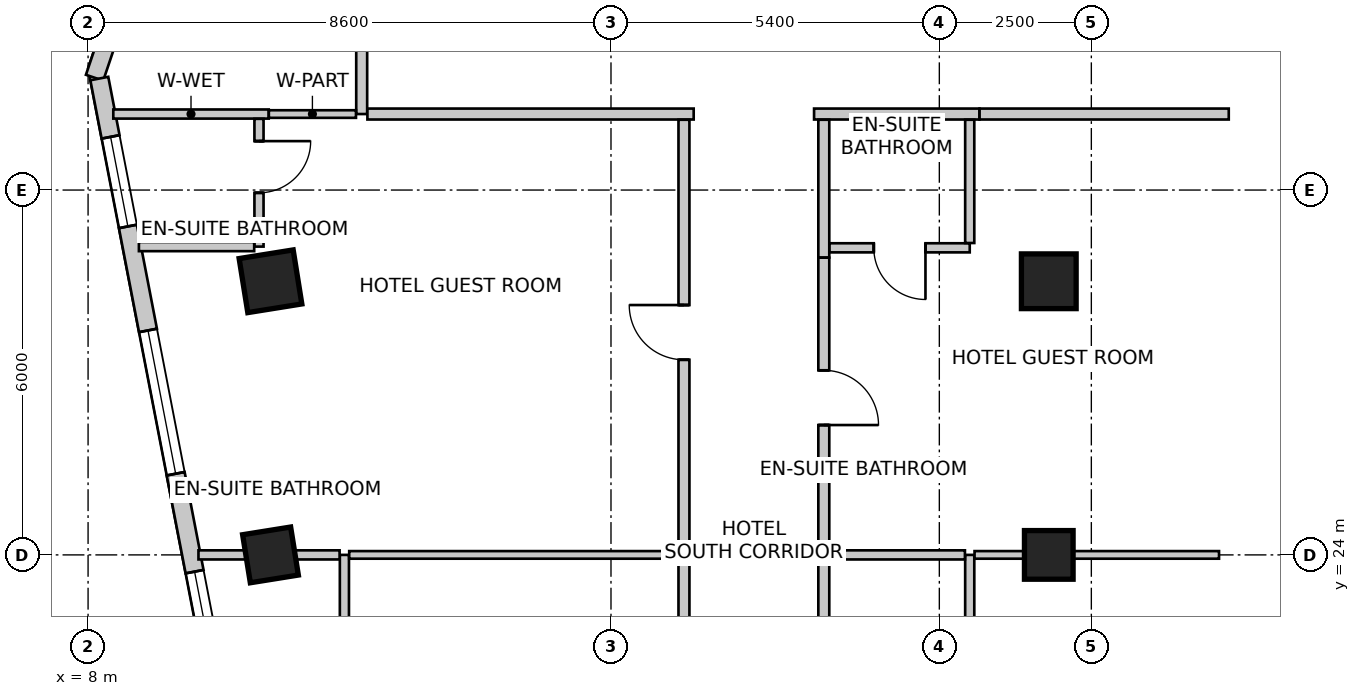
"""IFC4 building model, lengths in metres.
Left out: names, types, materials, properties, quantities, classifications, styles, units other than length and angle.
Written with IfcOpenShell. Run it as: python <this file> out.ifc"""

import sys

from ifc_helpers import new_model, si_unit, direction, frame, frame_2d, origin, origin_2d, place, context, subcontext, project, spatial, rectangle, extrude, source, transform, mapped, element, fill, save


model = new_model("IFC4")
c1 = context("Model", 3, precision=1e-05, world=origin(), true_north=direction((0.0, 1.0)))
c2 = subcontext(c1, "Body", "Model", "MODEL_VIEW")
j1 = project(units=[si_unit("LENGTHUNIT", "METRE"), si_unit("PLANEANGLEUNIT", "RADIAN")], contexts=[c1])
p1 = place(None, origin())
s1 = spatial("IfcSite", under=j1, at=p1, CompositionType="ELEMENT")
p2 = place(p1, origin())
s2 = spatial("IfcBuilding", under=s1, at=p2, CompositionType="ELEMENT")
p3 = place(p2, frame((0.0, 0.0, 128.6)))
s3 = spatial("IfcBuildingStorey", under=s2, at=p3, CompositionType="ELEMENT", Elevation=128.6)
m1 = source(origin(), c2, "Body", "SweptSolid", [
    extrude(rectangle(XDim=0.9, YDim=0.9, at=origin_2d()), origin(), (0.0, 0.0, 1.0), 3.6),
])
p4 = place(p3, frame((11.0, 28.5, 0.0), z_axis=(0.0, 0.0, 1.0), x_axis=(0.158158067254, -0.987413806751, 0.0)))
e1 = element("IfcColumn", 1, at=p4, inside=s3, PredefinedType="COLUMN", context=c2, shape_type="MappedRepresentation", body=[
    mapped(m1, transform((0.0, 0.0, 0.0), scale=1.0)),
])
m2 = source(origin(), c2, "Body", "SweptSolid", [
    extrude(rectangle(XDim=0.8, YDim=0.8, at=origin_2d()), origin(), (0.0, 0.0, 1.0), 3.6),
])
p5 = place(p3, frame((11.0, 24.0, 0.0), z_axis=(0.0, 0.0, 1.0), x_axis=(0.158158067254, -0.987413806751, 0.0)))
e2 = element("IfcColumn", 2, at=p5, inside=s3, PredefinedType="COLUMN", context=c2, shape_type="MappedRepresentation", body=[
    mapped(m2, transform((0.0, 0.0, 0.0), scale=1.0)),
])
p6 = place(p3, frame((23.8, 28.5, 0.0), z_axis=(0.0, 0.0, 1.0), x_axis=(1.0, 0.0, 0.0)))
e3 = element("IfcColumn", 3, at=p6, inside=s3, PredefinedType="COLUMN", context=c2, shape_type="MappedRepresentation", body=[
    mapped(m1, transform((0.0, 0.0, 0.0), scale=1.0)),
])
p7 = place(p3, frame((23.8, 24.0, 0.0), z_axis=(0.0, 0.0, 1.0), x_axis=(1.0, 0.0, 0.0)))
e4 = element("IfcColumn", 4, at=p7, inside=s3, PredefinedType="COLUMN", context=c2, shape_type="MappedRepresentation", body=[
    mapped(m2, transform((0.0, 0.0, 0.0), scale=1.0)),
])
p8 = place(p3, frame((13.269, 47.134, 0.0), z_axis=(0.0, 0.0, 1.0), x_axis=(-0.319929596295, -0.947441319246, 0.0)))
e5 = element("IfcWall", 5, at=p8, inside=s3, PredefinedType="SOLIDWALL", context=c2, shape_type="SweptSolid", body=[
    extrude(rectangle(XDim=16.134, YDim=0.3, at=frame_2d((8.067, 0.0))), origin(), (0.0, 0.0, 1.0), 3.35),
])
m3 = source(origin(), c2, "Body", "SweptSolid", [
    extrude(rectangle(XDim=2.1, YDim=2.0, at=frame_2d((1.05, 1.0))), frame((0.0, 0.16, 0.0), z_axis=(0.0, -1.0, 0.0), x_axis=(1.0, 0.0, 0.0)), (0.0, 0.0, 1.0), 0.32),
])
p9 = place(p8, frame((2.426, 0.0, 0.85)))
e6 = element("IfcOpeningElement", 6, at=p9, cuts=e5, PredefinedType="OPENING", context=c2, shape_type="MappedRepresentation", body=[
    mapped(m3, transform((0.0, 0.0, 0.0), scale=1.0)),
])
m4 = source(origin(), c2, "Body", "SweptSolid", [
    extrude(rectangle(XDim=2.4, YDim=2.2, at=frame_2d((1.2, 1.1))), frame((0.0, 0.16, 0.0), z_axis=(0.0, -1.0, 0.0), x_axis=(1.0, 0.0, 0.0)), (0.0, 0.0, 1.0), 0.32),
])
p10 = place(p8, frame((7.211, 0.0, 0.85)))
e7 = element("IfcOpeningElement", 7, at=p10, cuts=e5, PredefinedType="OPENING", context=c2, shape_type="MappedRepresentation", body=[
    mapped(m4, transform((0.0, 0.0, 0.0), scale=1.0)),
])
p11 = place(p8, frame((12.297, 0.0, 0.85)))
e8 = element("IfcOpeningElement", 8, at=p11, cuts=e5, PredefinedType="OPENING", context=c2, shape_type="MappedRepresentation", body=[
    mapped(m3, transform((0.0, 0.0, 0.0), scale=1.0)),
])
p12 = place(p3, frame((8.185, 31.834, 0.0), z_axis=(0.0, 0.0, 1.0), x_axis=(0.189707113148, -0.981840725994, 0.0)))
e9 = element("IfcWall", 9, at=p12, inside=s3, PredefinedType="SOLIDWALL", context=c2, shape_type="SweptSolid", body=[
    extrude(rectangle(XDim=21.221, YDim=0.3, at=frame_2d((10.611, 0.0))), origin(), (0.0, 0.0, 1.0), 3.35),
])
m5 = source(origin(), c2, "Body", "SweptSolid", [
    extrude(rectangle(XDim=1.5, YDim=1.8, at=frame_2d((0.75, 0.9))), frame((0.0, 0.16, 0.0), z_axis=(0.0, -1.0, 0.0), x_axis=(1.0, 0.0, 0.0)), (0.0, 0.0, 1.0), 0.32),
])
p13 = place(p12, frame((0.977, 0.0, 0.85)))
e10 = element("IfcOpeningElement", 10, at=p13, cuts=e9, PredefinedType="OPENING", context=c2, shape_type="MappedRepresentation", body=[
    mapped(m5, transform((0.0, 0.0, 0.0), scale=1.0)),
])
p14 = place(p12, frame((4.219, 0.0, 0.85)))
e11 = element("IfcOpeningElement", 11, at=p14, cuts=e9, PredefinedType="OPENING", context=c2, shape_type="MappedRepresentation", body=[
    mapped(m4, transform((0.0, 0.0, 0.0), scale=1.0)),
])
p15 = place(p12, frame((8.259, 0.0, 0.85)))
e12 = element("IfcOpeningElement", 12, at=p15, cuts=e9, PredefinedType="OPENING", context=c2, shape_type="MappedRepresentation", body=[
    mapped(m5, transform((0.0, 0.0, 0.0), scale=1.0)),
])
m6 = source(origin(), c2, "Body", "SweptSolid", [
    extrude(rectangle(XDim=1.8, YDim=2.1, at=frame_2d((0.9, 1.05))), frame((0.0, 0.16, 0.0), z_axis=(0.0, -1.0, 0.0), x_axis=(1.0, 0.0, 0.0)), (0.0, 0.0, 1.0), 0.32),
])
p16 = place(p12, frame((10.401, 0.0, 0.85)))
e13 = element("IfcOpeningElement", 13, at=p16, cuts=e9, PredefinedType="OPENING", context=c2, shape_type="MappedRepresentation", body=[
    mapped(m6, transform((0.0, 0.0, 0.0), scale=1.0)),
])
p17 = place(p12, frame((12.842, 0.0, 0.85)))
e14 = element("IfcOpeningElement", 14, at=p17, cuts=e9, PredefinedType="OPENING", context=c2, shape_type="MappedRepresentation", body=[
    mapped(m5, transform((0.0, 0.0, 0.0), scale=1.0)),
])
p18 = place(p12, frame((16.661, 0.0, 0.85)))
e15 = element("IfcOpeningElement", 15, at=p18, cuts=e9, PredefinedType="OPENING", context=c2, shape_type="MappedRepresentation", body=[
    mapped(m4, transform((0.0, 0.0, 0.0), scale=1.0)),
])
p19 = place(p3, frame((12.5, 31.25, 0.0), z_axis=(0.0, 0.0, 1.0), x_axis=(0.0, 1.0, 0.0)))
e16 = element("IfcWall", 16, at=p19, inside=s3, PredefinedType="PARTITIONING", context=c2, shape_type="SweptSolid", body=[
    extrude(rectangle(XDim=2.2, YDim=0.18, at=frame_2d((1.1, 0.0))), origin(), (0.0, 0.0, 1.0), 3.019),
])
p20 = place(p3, frame((17.96, 31.25, 0.0), z_axis=(0.0, 0.0, 1.0), x_axis=(-1.0, 0.0, 0.0)))
e17 = element("IfcWall", 17, at=p20, inside=s3, PredefinedType="PARTITIONING", context=c2, shape_type="SweptSolid", body=[
    extrude(rectangle(XDim=5.366, YDim=0.18, at=frame_2d((2.683, 0.0))), origin(), (0.0, 0.0, 1.0), 3.019),
])
p21 = place(p3, frame((22.66, 31.25, 0.0), z_axis=(0.0, 0.0, 1.0), x_axis=(-1.0, 0.0, 0.0)))
e18 = element("IfcWall", 18, at=p21, inside=s3, PredefinedType="PARTITIONING", context=c2, shape_type="SweptSolid", body=[
    extrude(rectangle(XDim=2.72, YDim=0.18, at=frame_2d((1.36, 0.0))), origin(), (0.0, 0.0, 1.0), 3.019),
])
p22 = place(p3, frame((26.76, 31.25, 0.0), z_axis=(0.0, 0.0, 1.0), x_axis=(-1.0, 0.0, 0.0)))
e19 = element("IfcWall", 19, at=p22, inside=s3, PredefinedType="PARTITIONING", context=c2, shape_type="SweptSolid", body=[
    extrude(rectangle(XDim=4.098, YDim=0.18, at=frame_2d((2.049, 0.0))), origin(), (0.0, 0.0, 1.0), 3.35),
])
p23 = place(p3, frame((10.971, 31.25, 0.0), z_axis=(0.0, 0.0, 1.0), x_axis=(-1.0, 0.0, 0.0)))
e20 = element("IfcWall", 20, at=p23, inside=s3, PredefinedType="PARTITIONING", context=c2, shape_type="SweptSolid", body=[
    extrude(rectangle(XDim=2.556, YDim=0.15, at=frame_2d((1.278, 0.0))), origin(), (0.0, 0.0, 1.0), 2.492),
])
p24 = place(p3, frame((12.406, 31.25, 0.0), z_axis=(0.0, 0.0, 1.0), x_axis=(-1.0, 0.0, 0.0)))
e21 = element("IfcWall", 21, at=p24, inside=s3, PredefinedType="PARTITIONING", context=c2, shape_type="SweptSolid", body=[
    extrude(rectangle(XDim=1.433, YDim=0.125, at=frame_2d((0.717, 0.0))), origin(), (0.0, 0.0, 1.0), 2.492),
])
p25 = place(p3, frame((17.8, 19.662, 0.0), z_axis=(0.0, 0.0, 1.0), x_axis=(0.0, 1.0, 0.0)))
e22 = element("IfcWall", 22, at=p25, inside=s3, PredefinedType="PARTITIONING", context=c2, shape_type="SweptSolid", body=[
    extrude(rectangle(XDim=4.498, YDim=0.18, at=frame_2d((2.249, 0.0))), origin(), (0.0, 0.0, 1.0), 2.803),
])
m7 = source(origin(), c2, "Body", "SweptSolid", [
    extrude(rectangle(XDim=0.9, YDim=2.15, at=frame_2d((0.45, 1.075))), frame((0.0, 0.1, 0.0), z_axis=(0.0, -1.0, 0.0), x_axis=(1.0, 0.0, 0.0)), (0.0, 0.0, 1.0), 0.2),
])
p26 = place(p25, frame((1.738, 0.0, 0.0)))
e23 = element("IfcOpeningElement", 23, at=p26, cuts=e22, PredefinedType="OPENING", context=c2, shape_type="MappedRepresentation", body=[
    mapped(m7, transform((0.0, 0.0, 0.0), scale=1.0)),
])
p27 = place(p3, frame((20.1, 24.16, 0.0), z_axis=(0.0, 0.0, 1.0), x_axis=(0.0, -1.0, 0.0)))
e24 = element("IfcWall", 24, at=p27, inside=s3, PredefinedType="PARTITIONING", context=c2, shape_type="SweptSolid", body=[
    extrude(rectangle(XDim=2.3, YDim=0.18, at=frame_2d((1.15, 0.0))), origin(), (0.0, 0.0, 1.0), 2.803),
])
p28 = place(p3, frame((17.8, 24.162, 0.0), z_axis=(0.0, 0.0, 1.0), x_axis=(0.0, 1.0, 0.0)))
e25 = element("IfcWall", 25, at=p28, inside=s3, PredefinedType="PARTITIONING", context=c2, shape_type="SweptSolid", body=[
    extrude(rectangle(XDim=6.994, YDim=0.18, at=frame_2d((3.497, 0.0))), origin(), (0.0, 0.0, 1.0), 2.803),
])
p29 = place(p28, frame((3.047, 0.0, 0.0)))
e26 = element("IfcOpeningElement", 26, at=p29, cuts=e25, PredefinedType="OPENING", context=c2, shape_type="MappedRepresentation", body=[
    mapped(m7, transform((0.0, 0.0, 0.0), scale=1.0)),
])
p30 = place(p3, frame((20.1, 31.156, 0.0), z_axis=(0.0, 0.0, 1.0), x_axis=(0.0, -1.0, 0.0)))
e27 = element("IfcWall", 27, at=p30, inside=s3, PredefinedType="PARTITIONING", context=c2, shape_type="SweptSolid", body=[
    extrude(rectangle(XDim=2.266, YDim=0.18, at=frame_2d((1.133, 0.0))), origin(), (0.0, 0.0, 1.0), 3.019),
])
p31 = place(p3, frame((20.1, 28.888, 0.0), z_axis=(0.0, 0.0, 1.0), x_axis=(0.0, -1.0, 0.0)))
e28 = element("IfcWall", 28, at=p31, inside=s3, PredefinedType="PARTITIONING", context=c2, shape_type="SweptSolid", body=[
    extrude(rectangle(XDim=4.726, YDim=0.18, at=frame_2d((2.363, 0.0))), origin(), (0.0, 0.0, 1.0), 2.803),
])
p32 = place(p31, frame((1.853, 0.0, 0.0)))
e29 = element("IfcOpeningElement", 29, at=p32, cuts=e28, PredefinedType="OPENING", context=c2, shape_type="MappedRepresentation", body=[
    mapped(m7, transform((0.0, 0.0, 0.0), scale=1.0)),
])
p33 = place(p3, frame((12.216, 24.0, 0.0), z_axis=(0.0, 0.0, 1.0), x_axis=(0.0, -1.0, 0.0)))
e30 = element("IfcWall", 30, at=p33, inside=s3, PredefinedType="PARTITIONING", context=c2, shape_type="SweptSolid", body=[
    extrude(rectangle(XDim=1.901, YDim=0.15, at=frame_2d((0.95, 0.0))), origin(), (0.0, 0.0, 1.0), 2.803),
])
p34 = place(p3, frame((9.816, 24.0, 0.0), z_axis=(0.0, 0.0, 1.0), x_axis=(1.0, 0.0, 0.0)))
e31 = element("IfcWall", 31, at=p34, inside=s3, PredefinedType="PARTITIONING", context=c2, shape_type="SweptSolid", body=[
    extrude(rectangle(XDim=2.321, YDim=0.15, at=frame_2d((1.161, 0.0))), origin(), (0.0, 0.0, 1.0), 2.492),
])
p35 = place(p3, frame((12.295, 24.0, 0.0), z_axis=(0.0, 0.0, 1.0), x_axis=(1.0, 0.0, 0.0)))
e32 = element("IfcWall", 32, at=p35, inside=s3, PredefinedType="PARTITIONING", context=c2, shape_type="SweptSolid", body=[
    extrude(rectangle(XDim=5.411, YDim=0.125, at=frame_2d((2.706, 0.0))), origin(), (0.0, 0.0, 1.0), 2.803),
])
p36 = place(p3, frame((22.5, 24.0, 0.0), z_axis=(0.0, 0.0, 1.0), x_axis=(0.0, -1.0, 0.0)))
e33 = element("IfcWall", 33, at=p36, inside=s3, PredefinedType="PARTITIONING", context=c2, shape_type="SweptSolid", body=[
    extrude(rectangle(XDim=1.901, YDim=0.15, at=frame_2d((0.95, 0.0))), origin(), (0.0, 0.0, 1.0), 2.803),
])
p37 = place(p3, frame((20.194, 24.0, 0.0), z_axis=(0.0, 0.0, 1.0), x_axis=(1.0, 0.0, 0.0)))
e34 = element("IfcWall", 34, at=p37, inside=s3, PredefinedType="PARTITIONING", context=c2, shape_type="SweptSolid", body=[
    extrude(rectangle(XDim=2.227, YDim=0.15, at=frame_2d((1.113, 0.0))), origin(), (0.0, 0.0, 1.0), 2.803),
])
p38 = place(p3, frame((22.579, 24.0, 0.0), z_axis=(0.0, 0.0, 1.0), x_axis=(1.0, 0.0, 0.0)))
e35 = element("IfcWall", 35, at=p38, inside=s3, PredefinedType="PARTITIONING", context=c2, shape_type="SweptSolid", body=[
    extrude(rectangle(XDim=4.021, YDim=0.125, at=frame_2d((2.01, 0.0))), origin(), (0.0, 0.0, 1.0), 2.492),
])
p39 = place(p3, frame((10.811, 31.171, 0.0), z_axis=(0.0, 0.0, 1.0), x_axis=(0.0, -1.0, 0.0)))
e36 = element("IfcWall", 36, at=p39, inside=s3, PredefinedType="PARTITIONING", context=c2, shape_type="SweptSolid", body=[
    extrude(rectangle(XDim=2.101, YDim=0.15, at=frame_2d((1.05, 0.0))), origin(), (0.0, 0.0, 1.0), 2.492),
])
m8 = source(origin(), c2, "Body", "SweptSolid", [
    extrude(rectangle(XDim=0.85, YDim=2.15, at=frame_2d((0.425, 1.075))), frame((0.0, 0.085, 0.0), z_axis=(0.0, -1.0, 0.0), x_axis=(1.0, 0.0, 0.0)), (0.0, 0.0, 1.0), 0.17),
])
p40 = place(p39, frame((0.366, 0.0, 0.0)))
e37 = element("IfcOpeningElement", 37, at=p40, cuts=e36, PredefinedType="OPENING", context=c2, shape_type="MappedRepresentation", body=[
    mapped(m8, transform((0.0, 0.0, 0.0), scale=1.0)),
])
p41 = place(p3, frame((10.732, 29.07, 0.0), z_axis=(0.0, 0.0, 1.0), x_axis=(-1.0, 0.0, 0.0)))
e38 = element("IfcWall", 38, at=p41, inside=s3, PredefinedType="PARTITIONING", context=c2, shape_type="SweptSolid", body=[
    extrude(rectangle(XDim=1.896, YDim=0.15, at=frame_2d((0.948, 0.0))), origin(), (0.0, 0.0, 1.0), 3.35),
])
p42 = place(p3, frame((22.5, 29.05, 0.0), z_axis=(0.0, 0.0, 1.0), x_axis=(-1.0, 0.0, 0.0)))
e39 = element("IfcWall", 39, at=p42, inside=s3, PredefinedType="PARTITIONING", context=c2, shape_type="SweptSolid", body=[
    extrude(rectangle(XDim=2.306, YDim=0.15, at=frame_2d((1.153, 0.0))), origin(), (0.0, 0.0, 1.0), 3.019),
])
p43 = place(p42, frame((0.728, 0.0, 0.0)))
e40 = element("IfcOpeningElement", 40, at=p43, cuts=e39, PredefinedType="OPENING", context=c2, shape_type="MappedRepresentation", body=[
    mapped(m8, transform((0.0, 0.0, 0.0), scale=1.0)),
])
p44 = place(p3, frame((22.5, 31.156, 0.0), z_axis=(0.0, 0.0, 1.0), x_axis=(0.0, -1.0, 0.0)))
e41 = element("IfcWall", 41, at=p44, inside=s3, PredefinedType="PARTITIONING", context=c2, shape_type="SweptSolid", body=[
    extrude(rectangle(XDim=2.027, YDim=0.15, at=frame_2d((1.014, 0.0))), origin(), (0.0, 0.0, 1.0), 3.019),
])
m9 = source(origin(), c2, "Body", "SweptSolid", [
    extrude(rectangle(XDim=1.5, YDim=1.8, at=frame_2d((0.75, 0.9))), frame((0.0, -0.015, 0.0), z_axis=(0.0, -1.0, 0.0), x_axis=(1.0, 0.0, 0.0)), (0.0, 0.0, 1.0), 0.06),
])
p45 = place(p13, origin())
e42 = element("IfcWindow", 42, at=p45, inside=s3, PartitioningType="SINGLE_PANEL", PredefinedType="WINDOW", context=c2, shape_type="MappedRepresentation", body=[
    mapped(m9, transform((0.0, 0.0, 0.0), scale=1.0)),
])
fill(e10, e42)
m10 = source(origin(), c2, "Body", "SweptSolid", [
    extrude(rectangle(XDim=2.4, YDim=2.2, at=frame_2d((1.2, 1.1))), frame((0.0, -0.015, 0.0), z_axis=(0.0, -1.0, 0.0), x_axis=(1.0, 0.0, 0.0)), (0.0, 0.0, 1.0), 0.06),
])
p46 = place(p14, origin())
e43 = element("IfcWindow", 43, at=p46, inside=s3, PartitioningType="SINGLE_PANEL", PredefinedType="WINDOW", context=c2, shape_type="MappedRepresentation", body=[
    mapped(m10, transform((0.0, 0.0, 0.0), scale=1.0)),
])
fill(e11, e43)
p47 = place(p15, origin())
e44 = element("IfcWindow", 44, at=p47, inside=s3, PartitioningType="SINGLE_PANEL", PredefinedType="WINDOW", context=c2, shape_type="MappedRepresentation", body=[
    mapped(m9, transform((0.0, 0.0, 0.0), scale=1.0)),
])
fill(e12, e44)
m11 = source(origin(), c2, "Body", "SweptSolid", [
    extrude(rectangle(XDim=0.85, YDim=2.15, at=frame_2d((0.425, 1.075))), frame((0.0, 0.025, 0.0), z_axis=(0.0, -1.0, 0.0), x_axis=(1.0, 0.0, 0.0)), (0.0, 0.0, 1.0), 0.05),
])
p48 = place(p40, origin())
e45 = element("IfcDoor", 45, at=p48, inside=s3, OperationType="SINGLE_SWING_LEFT", PredefinedType="DOOR", context=c2, shape_type="MappedRepresentation", body=[
    mapped(m11, transform((0.0, 0.0, 0.0), scale=1.0)),
])
fill(e37, e45)
m12 = source(origin(), c2, "Body", "SweptSolid", [
    extrude(rectangle(XDim=0.9, YDim=2.15, at=frame_2d((0.45, 1.075))), frame((0.0, 0.025, 0.0), z_axis=(0.0, -1.0, 0.0), x_axis=(1.0, 0.0, 0.0)), (0.0, 0.0, 1.0), 0.05),
])
p49 = place(p29, origin())
e46 = element("IfcDoor", 46, at=p49, inside=s3, OperationType="SINGLE_SWING_RIGHT", PredefinedType="DOOR", context=c2, shape_type="MappedRepresentation", body=[
    mapped(m12, transform((0.0, 0.0, 0.0), scale=1.0)),
])
fill(e26, e46)
p50 = place(p43, origin())
e47 = element("IfcDoor", 47, at=p50, inside=s3, OperationType="SINGLE_SWING_LEFT", PredefinedType="DOOR", context=c2, shape_type="MappedRepresentation", body=[
    mapped(m11, transform((0.0, 0.0, 0.0), scale=1.0)),
])
fill(e40, e47)
p51 = place(p32, origin())
e48 = element("IfcDoor", 48, at=p51, inside=s3, OperationType="SINGLE_SWING_RIGHT", PredefinedType="DOOR", context=c2, shape_type="MappedRepresentation", body=[
    mapped(m12, transform((0.0, 0.0, 0.0), scale=1.0)),
])
fill(e29, e48)
save(model, sys.argv[1])
